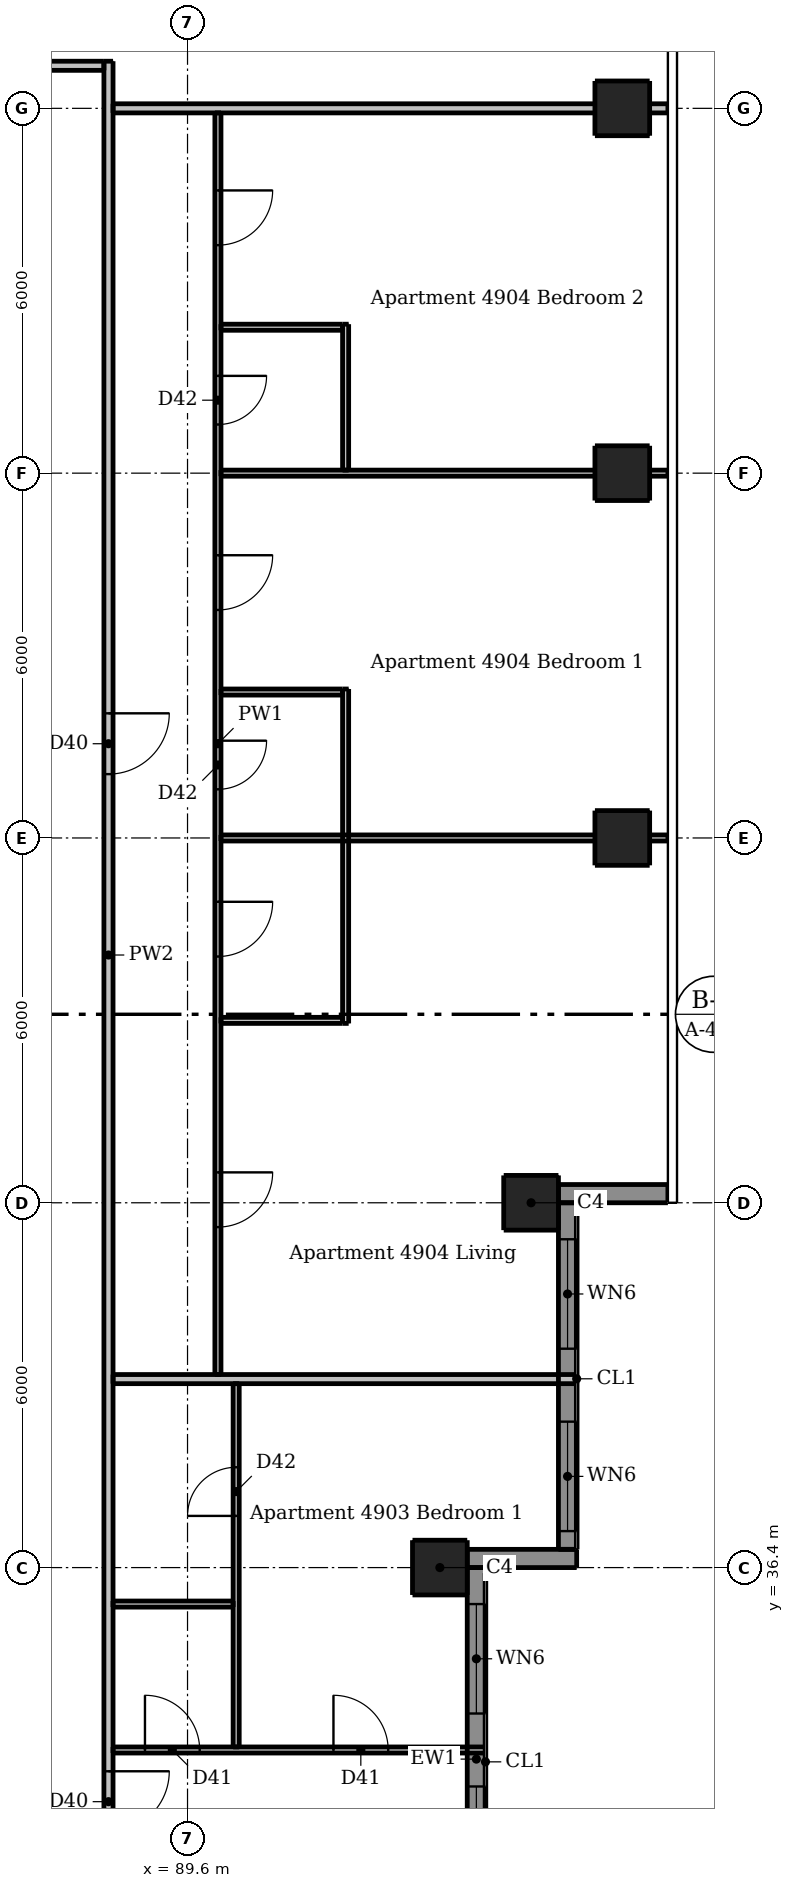
"""IFC4 building model, lengths in metres.
Left out: names, types, materials, properties, quantities, classifications, styles, units other than length and angle.
Written with IfcOpenShell. Run it as: python <this file> out.ifc"""

import sys

from ifc_helpers import new_model, si_unit, direction, frame, frame_2d, origin, origin_2d, place, context, subcontext, project, spatial, rectangle, extrude, element, fill, save


model = new_model("IFC4")
c1 = context("Model", 3, precision=1e-05, world=origin(), true_north=direction((0.0, 1.0)))
c2 = subcontext(c1, "Body", "Model", "MODEL_VIEW")
j1 = project(units=[si_unit("LENGTHUNIT", "METRE"), si_unit("PLANEANGLEUNIT", "RADIAN")], contexts=[c1])
p1 = place(None, origin())
s1 = spatial("IfcSite", under=j1, at=p1, CompositionType="ELEMENT")
p2 = place(p1, origin())
s2 = spatial("IfcBuilding", under=s1, at=p2, CompositionType="ELEMENT")
p3 = place(p2, frame((0.0, 0.0, 187.0)))
s3 = spatial("IfcBuildingStorey", under=s2, at=p3, CompositionType="ELEMENT", Elevation=187.0)
for number, where, z_axis, x_axis in (
    (1, (93.75, 36.4, 0.0), (0.0, 0.0, 1.0), (1.0, 0.0, 0.0)),
    (2, (95.25, 42.4, 0.0), (0.0, 0.0, 1.0), (1.0, 0.0, 0.0)),
    (3, (96.75, 48.4, 0.0), (0.0, 0.0, 1.0), (1.0, 0.0, 0.0)),
    (4, (96.75, 54.4, 0.0), (0.0, 0.0, 1.0), (1.0, 0.0, 0.0)),
    (5, (96.75, 60.4, 0.0), (0.0, 0.0, 1.0), (1.0, 0.0, 0.0)),
):
    element("IfcColumn", number, at=place(p3, frame(where, z_axis=z_axis, x_axis=x_axis)), inside=s3, PredefinedType="COLUMN", context=c2, shape_type="SweptSolid", body=[
        extrude(rectangle(XDim=0.9, YDim=0.9, at=origin_2d()), origin(), (0.0, 0.0, 1.0), 3.05),
    ])
for number, where, z_axis, x_axis in (
    (6, (94.2, 36.55, 0.0), (0.0, 0.0, 1.0), (1.0, 0.0, 0.0)),
    (7, (95.7, 42.55, 0.0), (0.0, 0.0, 1.0), (1.0, 0.0, 0.0)),
):
    element("IfcWall", number, at=place(p3, frame(where, z_axis=z_axis, x_axis=x_axis)), inside=s3, PredefinedType="SOLIDWALL", context=c2, shape_type="SweptSolid", body=[
        extrude(rectangle(XDim=1.8, YDim=0.3, at=frame_2d((0.9, 0.0))), origin(), (0.0, 0.0, 1.0), 3.05),
    ])
p4 = place(p3, frame((94.35, 30.1, 0.0), z_axis=(0.0, 0.0, 1.0), x_axis=(0.0, 1.0, 0.0)))
e8 = element("IfcWall", 8, at=p4, inside=s3, PredefinedType="SOLIDWALL", context=c2, shape_type="SweptSolid", body=[
    extrude(rectangle(XDim=6.3, YDim=0.3, at=frame_2d((3.15, 0.0))), origin(), (0.0, 0.0, 1.0), 3.05),
])
p5 = place(p4, frame((0.9, 0.0, 0.15)))
e9 = element("IfcOpeningElement", 9, at=p5, cuts=e8, PredefinedType="OPENING", context=c2, shape_type="SweptSolid", body=[
    extrude(rectangle(XDim=1.8, YDim=2.1, at=frame_2d((0.9, 1.05))), frame((0.0, 0.16, 0.0), z_axis=(0.0, -1.0, 0.0), x_axis=(1.0, 0.0, 0.0)), (0.0, 0.0, 1.0), 0.32),
])
p6 = place(p4, frame((3.9, 0.0, 0.15)))
e10 = element("IfcOpeningElement", 10, at=p6, cuts=e8, PredefinedType="OPENING", context=c2, shape_type="SweptSolid", body=[
    extrude(rectangle(XDim=1.8, YDim=2.1, at=frame_2d((0.9, 1.05))), frame((0.0, 0.16, 0.0), z_axis=(0.0, -1.0, 0.0), x_axis=(1.0, 0.0, 0.0)), (0.0, 0.0, 1.0), 0.32),
])
p7 = place(p3, frame((95.85, 36.7, 0.0), z_axis=(0.0, 0.0, 1.0), x_axis=(0.0, 1.0, 0.0)))
e11 = element("IfcWall", 11, at=p7, inside=s3, PredefinedType="SOLIDWALL", context=c2, shape_type="SweptSolid", body=[
    extrude(rectangle(XDim=5.7, YDim=0.3, at=frame_2d((2.85, 0.0))), origin(), (0.0, 0.0, 1.0), 3.05),
])
p8 = place(p7, frame((0.3, 0.0, 0.15)))
e12 = element("IfcOpeningElement", 12, at=p8, cuts=e11, PredefinedType="OPENING", context=c2, shape_type="SweptSolid", body=[
    extrude(rectangle(XDim=1.8, YDim=2.1, at=frame_2d((0.9, 1.05))), frame((0.0, 0.16, 0.0), z_axis=(0.0, -1.0, 0.0), x_axis=(1.0, 0.0, 0.0)), (0.0, 0.0, 1.0), 0.32),
])
p9 = place(p7, frame((3.3, 0.0, 0.15)))
e13 = element("IfcOpeningElement", 13, at=p9, cuts=e11, PredefinedType="OPENING", context=c2, shape_type="SweptSolid", body=[
    extrude(rectangle(XDim=1.8, YDim=2.1, at=frame_2d((0.9, 1.05))), frame((0.0, 0.16, 0.0), z_axis=(0.0, -1.0, 0.0), x_axis=(1.0, 0.0, 0.0)), (0.0, 0.0, 1.0), 0.32),
])
p10 = place(p3, frame((90.1, 60.325, 0.0), z_axis=(0.0, 0.0, 1.0), x_axis=(0.0, -1.0, 0.0)))
e14 = element("IfcWall", 14, at=p10, inside=s3, PredefinedType="PARTITIONING", context=c2, shape_type="SweptSolid", body=[
    extrude(rectangle(XDim=20.75, YDim=0.1, at=frame_2d((10.375, 0.0))), origin(), (0.0, 0.0, 1.0), 3.05),
])
p11 = place(p10, frame((17.425, 0.0, 0.0)))
e15 = element("IfcOpeningElement", 15, at=p11, cuts=e14, PredefinedType="OPENING", context=c2, shape_type="SweptSolid", body=[
    extrude(rectangle(XDim=0.9, YDim=2.1, at=frame_2d((0.45, 1.05))), frame((0.0, 0.06, 0.0), z_axis=(0.0, -1.0, 0.0), x_axis=(1.0, 0.0, 0.0)), (0.0, 0.0, 1.0), 0.12),
])
p12 = place(p10, frame((12.975, 0.0, 0.0)))
e16 = element("IfcOpeningElement", 16, at=p12, cuts=e14, PredefinedType="OPENING", context=c2, shape_type="SweptSolid", body=[
    extrude(rectangle(XDim=0.9, YDim=2.1, at=frame_2d((0.45, 1.05))), frame((0.0, 0.06, 0.0), z_axis=(0.0, -1.0, 0.0), x_axis=(1.0, 0.0, 0.0)), (0.0, 0.0, 1.0), 0.12),
])
p13 = place(p10, frame((7.275, 0.0, 0.0)))
e17 = element("IfcOpeningElement", 17, at=p13, cuts=e14, PredefinedType="OPENING", context=c2, shape_type="SweptSolid", body=[
    extrude(rectangle(XDim=0.9, YDim=2.1, at=frame_2d((0.45, 1.05))), frame((0.0, 0.06, 0.0), z_axis=(0.0, -1.0, 0.0), x_axis=(1.0, 0.0, 0.0)), (0.0, 0.0, 1.0), 0.12),
])
p14 = place(p10, frame((1.275, 0.0, 0.0)))
e18 = element("IfcOpeningElement", 18, at=p14, cuts=e14, PredefinedType="OPENING", context=c2, shape_type="SweptSolid", body=[
    extrude(rectangle(XDim=0.9, YDim=2.1, at=frame_2d((0.45, 1.05))), frame((0.0, 0.06, 0.0), z_axis=(0.0, -1.0, 0.0), x_axis=(1.0, 0.0, 0.0)), (0.0, 0.0, 1.0), 0.12),
])
p15 = place(p10, frame((10.325, 0.0, 0.0)))
e19 = element("IfcOpeningElement", 19, at=p15, cuts=e14, PredefinedType="OPENING", context=c2, shape_type="SweptSolid", body=[
    extrude(rectangle(XDim=0.8, YDim=2.1, at=frame_2d((0.4, 1.05))), frame((0.0, 0.06, 0.0), z_axis=(0.0, -1.0, 0.0), x_axis=(1.0, 0.0, 0.0)), (0.0, 0.0, 1.0), 0.12),
])
p16 = place(p10, frame((4.325, 0.0, 0.0)))
e20 = element("IfcOpeningElement", 20, at=p16, cuts=e14, PredefinedType="OPENING", context=c2, shape_type="SweptSolid", body=[
    extrude(rectangle(XDim=0.8, YDim=2.1, at=frame_2d((0.4, 1.05))), frame((0.0, 0.06, 0.0), z_axis=(0.0, -1.0, 0.0), x_axis=(1.0, 0.0, 0.0)), (0.0, 0.0, 1.0), 0.12),
])
p17 = place(p3, frame((90.4, 33.45, 0.0), z_axis=(0.0, 0.0, 1.0), x_axis=(0.0, 1.0, 0.0)))
e21 = element("IfcWall", 21, at=p17, inside=s3, PredefinedType="PARTITIONING", context=c2, shape_type="SweptSolid", body=[
    extrude(rectangle(XDim=5.975, YDim=0.1, at=frame_2d((2.988, 0.0))), origin(), (0.0, 0.0, 1.0), 3.05),
])
p18 = place(p17, frame((3.8, 0.0, 0.0)))
e22 = element("IfcOpeningElement", 22, at=p18, cuts=e21, PredefinedType="OPENING", context=c2, shape_type="SweptSolid", body=[
    extrude(rectangle(XDim=0.8, YDim=2.1, at=frame_2d((0.4, 1.05))), frame((0.0, 0.06, 0.0), z_axis=(0.0, -1.0, 0.0), x_axis=(1.0, 0.0, 0.0)), (0.0, 0.0, 1.0), 0.12),
])
p19 = place(p3, frame((92.2, 45.35, 0.0), z_axis=(0.0, 0.0, 1.0), x_axis=(0.0, 1.0, 0.0)))
e23 = element("IfcWall", 23, at=p19, inside=s3, PredefinedType="PARTITIONING", context=c2, shape_type="SweptSolid", body=[
    extrude(rectangle(XDim=5.5, YDim=0.1, at=frame_2d((2.75, 0.0))), origin(), (0.0, 0.0, 1.0), 3.05),
])
p20 = place(p3, frame((92.2, 54.45, 0.0), z_axis=(0.0, 0.0, 1.0), x_axis=(0.0, 1.0, 0.0)))
e24 = element("IfcWall", 24, at=p20, inside=s3, PredefinedType="PARTITIONING", context=c2, shape_type="SweptSolid", body=[
    extrude(rectangle(XDim=2.4, YDim=0.1, at=frame_2d((1.2, 0.0))), origin(), (0.0, 0.0, 1.0), 3.05),
])
p21 = place(p3, frame((90.15, 56.8, 0.0), z_axis=(0.0, 0.0, 1.0), x_axis=(1.0, 0.0, 0.0)))
e25 = element("IfcWall", 25, at=p21, inside=s3, PredefinedType="PARTITIONING", context=c2, shape_type="SweptSolid", body=[
    extrude(rectangle(XDim=2.0, YDim=0.1, at=frame_2d((1.0, 0.0))), origin(), (0.0, 0.0, 1.0), 3.05),
])
p22 = place(p3, frame((90.15, 54.4, 0.0), z_axis=(0.0, 0.0, 1.0), x_axis=(1.0, 0.0, 0.0)))
e26 = element("IfcWall", 26, at=p22, inside=s3, PredefinedType="PARTITIONING", context=c2, shape_type="SweptSolid", body=[
    extrude(rectangle(XDim=7.35, YDim=0.1, at=frame_2d((3.675, 0.0))), origin(), (0.0, 0.0, 1.0), 2.516),
])
p23 = place(p3, frame((90.15, 50.8, 0.0), z_axis=(0.0, 0.0, 1.0), x_axis=(1.0, 0.0, 0.0)))
e27 = element("IfcWall", 27, at=p23, inside=s3, PredefinedType="PARTITIONING", context=c2, shape_type="SweptSolid", body=[
    extrude(rectangle(XDim=2.0, YDim=0.1, at=frame_2d((1.0, 0.0))), origin(), (0.0, 0.0, 1.0), 3.05),
])
p24 = place(p3, frame((90.15, 48.4, 0.0), z_axis=(0.0, 0.0, 1.0), x_axis=(1.0, 0.0, 0.0)))
e28 = element("IfcWall", 28, at=p24, inside=s3, PredefinedType="PARTITIONING", context=c2, shape_type="SweptSolid", body=[
    extrude(rectangle(XDim=7.35, YDim=0.1, at=frame_2d((3.675, 0.0))), origin(), (0.0, 0.0, 1.0), 2.516),
])
p25 = place(p3, frame((90.15, 45.4, 0.0), z_axis=(0.0, 0.0, 1.0), x_axis=(1.0, 0.0, 0.0)))
e29 = element("IfcWall", 29, at=p25, inside=s3, PredefinedType="PARTITIONING", context=c2, shape_type="SweptSolid", body=[
    extrude(rectangle(XDim=2.0, YDim=0.1, at=frame_2d((1.0, 0.0))), origin(), (0.0, 0.0, 1.0), 3.05),
])
p26 = place(p3, frame((88.375, 35.8, 0.0), z_axis=(0.0, 0.0, 1.0), x_axis=(1.0, 0.0, 0.0)))
e30 = element("IfcWall", 30, at=p26, inside=s3, PredefinedType="PARTITIONING", context=c2, shape_type="SweptSolid", body=[
    extrude(rectangle(XDim=1.975, YDim=0.1, at=frame_2d((0.988, 0.0))), origin(), (0.0, 0.0, 1.0), 3.05),
])
p27 = place(p3, frame((88.375, 33.4, 0.0), z_axis=(0.0, 0.0, 1.0), x_axis=(1.0, 0.0, 0.0)))
e31 = element("IfcWall", 31, at=p27, inside=s3, PredefinedType="PARTITIONING", context=c2, shape_type="SweptSolid", body=[
    extrude(rectangle(XDim=6.125, YDim=0.1, at=frame_2d((3.062, 0.0))), origin(), (0.0, 0.0, 1.0), 3.05),
])
p28 = place(p27, frame((0.525, 0.0, 0.0)))
e32 = element("IfcOpeningElement", 32, at=p28, cuts=e31, PredefinedType="OPENING", context=c2, shape_type="SweptSolid", body=[
    extrude(rectangle(XDim=0.9, YDim=2.1, at=frame_2d((0.45, 1.05))), frame((0.0, 0.06, 0.0), z_axis=(0.0, -1.0, 0.0), x_axis=(1.0, 0.0, 0.0)), (0.0, 0.0, 1.0), 0.12),
])
p29 = place(p27, frame((3.625, 0.0, 0.0)))
e33 = element("IfcOpeningElement", 33, at=p29, cuts=e31, PredefinedType="OPENING", context=c2, shape_type="SweptSolid", body=[
    extrude(rectangle(XDim=0.9, YDim=2.1, at=frame_2d((0.45, 1.05))), frame((0.0, 0.06, 0.0), z_axis=(0.0, -1.0, 0.0), x_axis=(1.0, 0.0, 0.0)), (0.0, 0.0, 1.0), 0.12),
])
p30 = place(p3, frame((88.3, 61.175, 0.0), z_axis=(0.0, 0.0, 1.0), x_axis=(0.0, -1.0, 0.0)))
e34 = element("IfcWall", 34, at=p30, inside=s3, PredefinedType="PARTITIONING", context=c2, shape_type="SweptSolid", body=[
    extrude(rectangle(XDim=29.4, YDim=0.15, at=frame_2d((14.7, 0.0))), origin(), (0.0, 0.0, 1.0), 3.05),
])
p31 = place(p30, frame((28.125, 0.0, 0.0)))
e35 = element("IfcOpeningElement", 35, at=p31, cuts=e34, PredefinedType="OPENING", context=c2, shape_type="SweptSolid", body=[
    extrude(rectangle(XDim=1.0, YDim=2.1, at=frame_2d((0.5, 1.05))), frame((0.0, 0.085, 0.0), z_axis=(0.0, -1.0, 0.0), x_axis=(1.0, 0.0, 0.0)), (0.0, 0.0, 1.0), 0.17),
])
p32 = place(p30, frame((10.725, 0.0, 0.0)))
e36 = element("IfcOpeningElement", 36, at=p32, cuts=e34, PredefinedType="OPENING", context=c2, shape_type="SweptSolid", body=[
    extrude(rectangle(XDim=1.0, YDim=2.1, at=frame_2d((0.5, 1.05))), frame((0.0, 0.085, 0.0), z_axis=(0.0, -1.0, 0.0), x_axis=(1.0, 0.0, 0.0)), (0.0, 0.0, 1.0), 0.17),
])
p33 = place(p3, frame((58.975, 61.1, 0.0), z_axis=(0.0, 0.0, 1.0), x_axis=(1.0, 0.0, 0.0)))
e37 = element("IfcWall", 37, at=p33, inside=s3, PredefinedType="PARTITIONING", context=c2, shape_type="SweptSolid", body=[
    extrude(rectangle(XDim=29.25, YDim=0.15, at=frame_2d((14.625, 0.0))), origin(), (0.0, 0.0, 1.0), 3.05),
])
p34 = place(p33, frame((9.125, 0.0, 0.0)))
e38 = element("IfcOpeningElement", 38, at=p34, cuts=e37, PredefinedType="OPENING", context=c2, shape_type="SweptSolid", body=[
    extrude(rectangle(XDim=1.0, YDim=2.1, at=frame_2d((0.5, 1.05))), frame((0.0, 0.085, 0.0), z_axis=(0.0, -1.0, 0.0), x_axis=(1.0, 0.0, 0.0)), (0.0, 0.0, 1.0), 0.17),
])
p35 = place(p33, frame((26.475, 0.0, 0.0)))
e39 = element("IfcOpeningElement", 39, at=p35, cuts=e37, PredefinedType="OPENING", context=c2, shape_type="SweptSolid", body=[
    extrude(rectangle(XDim=1.0, YDim=2.1, at=frame_2d((0.5, 1.05))), frame((0.0, 0.085, 0.0), z_axis=(0.0, -1.0, 0.0), x_axis=(1.0, 0.0, 0.0)), (0.0, 0.0, 1.0), 0.17),
])
p36 = place(p3, frame((88.375, 60.4, 0.0), z_axis=(0.0, 0.0, 1.0), x_axis=(1.0, 0.0, 0.0)))
e40 = element("IfcWall", 40, at=p36, inside=s3, PredefinedType="PARTITIONING", context=c2, shape_type="SweptSolid", body=[
    extrude(rectangle(XDim=9.125, YDim=0.15, at=frame_2d((4.562, 0.0))), origin(), (0.0, 0.0, 1.0), 2.59),
])
p37 = place(p3, frame((88.375, 39.5, 0.0), z_axis=(0.0, 0.0, 1.0), x_axis=(1.0, 0.0, 0.0)))
e41 = element("IfcWall", 41, at=p37, inside=s3, PredefinedType="PARTITIONING", context=c2, shape_type="SweptSolid", body=[
    extrude(rectangle(XDim=7.625, YDim=0.15, at=frame_2d((3.812, 0.0))), origin(), (0.0, 0.0, 1.0), 3.05),
])
p38 = place(p5, origin())
e42 = element("IfcWindow", 42, at=p38, inside=s3, PartitioningType="DOUBLE_PANEL_VERTICAL", PredefinedType="WINDOW", context=c2, shape_type="SweptSolid", body=[
    extrude(rectangle(XDim=1.8, YDim=2.1, at=frame_2d((0.9, 1.05))), frame((0.0, 0.03, 0.0), z_axis=(0.0, -1.0, 0.0), x_axis=(1.0, 0.0, 0.0)), (0.0, 0.0, 1.0), 0.06),
])
fill(e9, e42)
p39 = place(p6, origin())
e43 = element("IfcWindow", 43, at=p39, inside=s3, PartitioningType="DOUBLE_PANEL_VERTICAL", PredefinedType="WINDOW", context=c2, shape_type="SweptSolid", body=[
    extrude(rectangle(XDim=1.8, YDim=2.1, at=frame_2d((0.9, 1.05))), frame((0.0, 0.03, 0.0), z_axis=(0.0, -1.0, 0.0), x_axis=(1.0, 0.0, 0.0)), (0.0, 0.0, 1.0), 0.06),
])
fill(e10, e43)
p40 = place(p8, origin())
e44 = element("IfcWindow", 44, at=p40, inside=s3, PartitioningType="DOUBLE_PANEL_VERTICAL", PredefinedType="WINDOW", context=c2, shape_type="SweptSolid", body=[
    extrude(rectangle(XDim=1.8, YDim=2.1, at=frame_2d((0.9, 1.05))), frame((0.0, 0.03, 0.0), z_axis=(0.0, -1.0, 0.0), x_axis=(1.0, 0.0, 0.0)), (0.0, 0.0, 1.0), 0.06),
])
fill(e12, e44)
p41 = place(p9, origin())
e45 = element("IfcWindow", 45, at=p41, inside=s3, PartitioningType="DOUBLE_PANEL_VERTICAL", PredefinedType="WINDOW", context=c2, shape_type="SweptSolid", body=[
    extrude(rectangle(XDim=1.8, YDim=2.1, at=frame_2d((0.9, 1.05))), frame((0.0, 0.03, 0.0), z_axis=(0.0, -1.0, 0.0), x_axis=(1.0, 0.0, 0.0)), (0.0, 0.0, 1.0), 0.06),
])
fill(e13, e45)
p42 = place(p31, origin())
e46 = element("IfcDoor", 46, at=p42, inside=s3, OperationType="SINGLE_SWING_LEFT", PredefinedType="DOOR", context=c2, shape_type="SweptSolid", body=[
    extrude(rectangle(XDim=1.0, YDim=2.1, at=frame_2d((0.5, 1.05))), frame((0.0, 0.025, 0.0), z_axis=(0.0, -1.0, 0.0), x_axis=(1.0, 0.0, 0.0)), (0.0, 0.0, 1.0), 0.05),
])
fill(e35, e46)
p43 = place(p28, origin())
e47 = element("IfcDoor", 47, at=p43, inside=s3, OperationType="SINGLE_SWING_LEFT", PredefinedType="DOOR", context=c2, shape_type="SweptSolid", body=[
    extrude(rectangle(XDim=0.9, YDim=2.1, at=frame_2d((0.45, 1.05))), frame((0.0, 0.025, 0.0), z_axis=(0.0, -1.0, 0.0), x_axis=(1.0, 0.0, 0.0)), (0.0, 0.0, 1.0), 0.05),
])
fill(e32, e47)
p44 = place(p29, origin())
e48 = element("IfcDoor", 48, at=p44, inside=s3, OperationType="SINGLE_SWING_LEFT", PredefinedType="DOOR", context=c2, shape_type="SweptSolid", body=[
    extrude(rectangle(XDim=0.9, YDim=2.1, at=frame_2d((0.45, 1.05))), frame((0.0, 0.025, 0.0), z_axis=(0.0, -1.0, 0.0), x_axis=(1.0, 0.0, 0.0)), (0.0, 0.0, 1.0), 0.05),
])
fill(e33, e48)
p45 = place(p18, origin())
e49 = element("IfcDoor", 49, at=p45, inside=s3, OperationType="SINGLE_SWING_LEFT", PredefinedType="DOOR", context=c2, shape_type="SweptSolid", body=[
    extrude(rectangle(XDim=0.8, YDim=2.1, at=frame_2d((0.4, 1.05))), frame((0.0, 0.025, 0.0), z_axis=(0.0, -1.0, 0.0), x_axis=(1.0, 0.0, 0.0)), (0.0, 0.0, 1.0), 0.05),
])
fill(e22, e49)
p46 = place(p32, origin())
e50 = element("IfcDoor", 50, at=p46, inside=s3, OperationType="SINGLE_SWING_LEFT", PredefinedType="DOOR", context=c2, shape_type="SweptSolid", body=[
    extrude(rectangle(XDim=1.0, YDim=2.1, at=frame_2d((0.5, 1.05))), frame((0.0, 0.025, 0.0), z_axis=(0.0, -1.0, 0.0), x_axis=(1.0, 0.0, 0.0)), (0.0, 0.0, 1.0), 0.05),
])
fill(e36, e50)
p47 = place(p11, origin())
e51 = element("IfcDoor", 51, at=p47, inside=s3, OperationType="SINGLE_SWING_LEFT", PredefinedType="DOOR", context=c2, shape_type="SweptSolid", body=[
    extrude(rectangle(XDim=0.9, YDim=2.1, at=frame_2d((0.45, 1.05))), frame((0.0, 0.025, 0.0), z_axis=(0.0, -1.0, 0.0), x_axis=(1.0, 0.0, 0.0)), (0.0, 0.0, 1.0), 0.05),
])
fill(e15, e51)
p48 = place(p12, origin())
e52 = element("IfcDoor", 52, at=p48, inside=s3, OperationType="SINGLE_SWING_LEFT", PredefinedType="DOOR", context=c2, shape_type="SweptSolid", body=[
    extrude(rectangle(XDim=0.9, YDim=2.1, at=frame_2d((0.45, 1.05))), frame((0.0, 0.025, 0.0), z_axis=(0.0, -1.0, 0.0), x_axis=(1.0, 0.0, 0.0)), (0.0, 0.0, 1.0), 0.05),
])
fill(e16, e52)
p49 = place(p13, origin())
e53 = element("IfcDoor", 53, at=p49, inside=s3, OperationType="SINGLE_SWING_LEFT", PredefinedType="DOOR", context=c2, shape_type="SweptSolid", body=[
    extrude(rectangle(XDim=0.9, YDim=2.1, at=frame_2d((0.45, 1.05))), frame((0.0, 0.025, 0.0), z_axis=(0.0, -1.0, 0.0), x_axis=(1.0, 0.0, 0.0)), (0.0, 0.0, 1.0), 0.05),
])
fill(e17, e53)
p50 = place(p14, origin())
e54 = element("IfcDoor", 54, at=p50, inside=s3, OperationType="SINGLE_SWING_LEFT", PredefinedType="DOOR", context=c2, shape_type="SweptSolid", body=[
    extrude(rectangle(XDim=0.9, YDim=2.1, at=frame_2d((0.45, 1.05))), frame((0.0, 0.025, 0.0), z_axis=(0.0, -1.0, 0.0), x_axis=(1.0, 0.0, 0.0)), (0.0, 0.0, 1.0), 0.05),
])
fill(e18, e54)
p51 = place(p15, origin())
e55 = element("IfcDoor", 55, at=p51, inside=s3, OperationType="SINGLE_SWING_LEFT", PredefinedType="DOOR", context=c2, shape_type="SweptSolid", body=[
    extrude(rectangle(XDim=0.8, YDim=2.1, at=frame_2d((0.4, 1.05))), frame((0.0, 0.025, 0.0), z_axis=(0.0, -1.0, 0.0), x_axis=(1.0, 0.0, 0.0)), (0.0, 0.0, 1.0), 0.05),
])
fill(e19, e55)
p52 = place(p16, origin())
e56 = element("IfcDoor", 56, at=p52, inside=s3, OperationType="SINGLE_SWING_LEFT", PredefinedType="DOOR", context=c2, shape_type="SweptSolid", body=[
    extrude(rectangle(XDim=0.8, YDim=2.1, at=frame_2d((0.4, 1.05))), frame((0.0, 0.025, 0.0), z_axis=(0.0, -1.0, 0.0), x_axis=(1.0, 0.0, 0.0)), (0.0, 0.0, 1.0), 0.05),
])
fill(e20, e56)
save(model, sys.argv[1])
